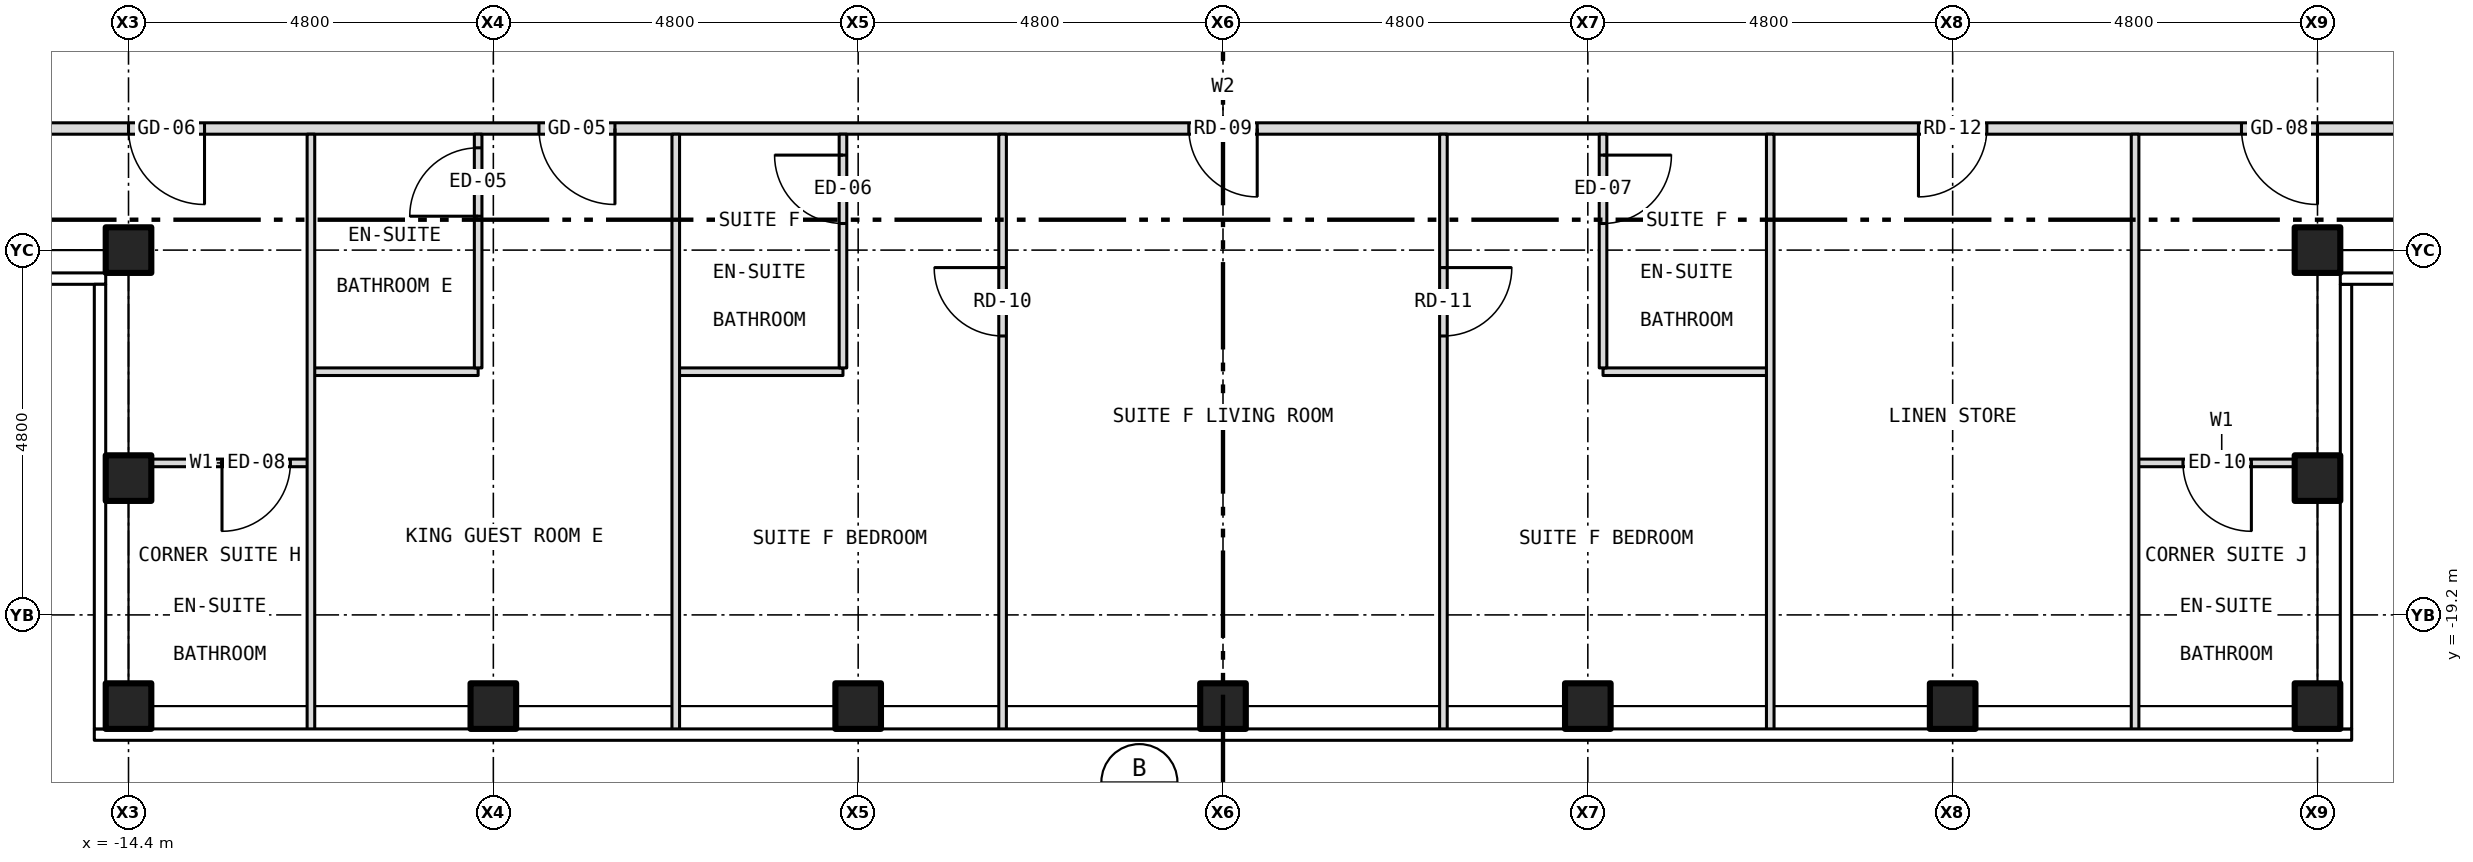
"""IFC4 building model, lengths in metres.
Left out: names, types, materials, properties, quantities, classifications, styles, units other than length and angle.
Written with IfcOpenShell. Run it as: python <this file> out.ifc"""

import sys

from ifc_helpers import new_model, si_unit, direction, frame, frame_2d, origin, origin_2d, place, context, subcontext, project, spatial, rectangle, hollow_rectangle, extrude, element, fill, save


model = new_model("IFC4")
c1 = context("Model", 3, precision=1e-05, world=origin(), true_north=direction((0.0, 1.0)))
c2 = subcontext(c1, "Body", "Model", "MODEL_VIEW")
j1 = project(units=[si_unit("LENGTHUNIT", "METRE"), si_unit("PLANEANGLEUNIT", "RADIAN")], contexts=[c1])
p1 = place(None, origin())
s1 = spatial("IfcSite", under=j1, at=p1, CompositionType="ELEMENT")
p2 = place(p1, origin())
s2 = spatial("IfcBuilding", under=s1, at=p2, CompositionType="ELEMENT")
p3 = place(p2, frame((0.0, 0.0, 258.5)))
s3 = spatial("IfcBuildingStorey", under=s2, at=p3, CompositionType="ELEMENT", Elevation=258.5)
for number, where, z_axis, x_axis in (
    (1, (-14.4, -20.4, -0.15), (0.0, 0.0, 1.0), (1.0, 0.0, 0.0)),
    (2, (-9.6, -20.4, -0.15), (0.0, 0.0, 1.0), (1.0, 0.0, 0.0)),
    (3, (-4.8, -20.4, -0.15), (0.0, 0.0, 1.0), (1.0, 0.0, 0.0)),
    (4, (0.0, -20.4, -0.15), (0.0, 0.0, 1.0), (1.0, 0.0, 0.0)),
    (5, (4.8, -20.4, -0.15), (0.0, 0.0, 1.0), (1.0, 0.0, 0.0)),
    (6, (9.6, -20.4, -0.15), (0.0, 0.0, 1.0), (1.0, 0.0, 0.0)),
    (7, (14.4, -20.4, -0.15), (0.0, 0.0, 1.0), (1.0, 0.0, 0.0)),
    (8, (-14.4, -14.4, -0.15), (0.0, 0.0, 1.0), (1.0, 0.0, 0.0)),
    (9, (-14.4, -17.4, -0.15), (0.0, 0.0, 1.0), (1.0, 0.0, 0.0)),
    (10, (14.4, -14.4, -0.15), (0.0, 0.0, 1.0), (1.0, 0.0, 0.0)),
    (11, (14.4, -17.4, -0.15), (0.0, 0.0, 1.0), (1.0, 0.0, 0.0)),
):
    element("IfcColumn", number, at=place(p3, frame(where, z_axis=z_axis, x_axis=x_axis)), inside=s3, PredefinedType="COLUMN", context=c2, shape_type="SweptSolid", body=[
        extrude(hollow_rectangle(XDim=0.6, YDim=0.6, WallThickness=0.03, at=origin_2d()), origin(), (0.0, 0.0, 1.0), 3.5),
    ])
p4 = place(p3, frame((-14.28, -17.2, 0.0), z_axis=(0.0, 0.0, 1.0), x_axis=(1.0, 0.0, 0.0)))
e12 = element("IfcWall", 12, at=p4, inside=s3, PredefinedType="PARTITIONING", context=c2, shape_type="SweptSolid", body=[
    extrude(rectangle(XDim=2.28, YDim=0.1, at=frame_2d((1.14, 0.0))), origin(), (0.0, 0.0, 1.0), 3.35),
])
p5 = place(p4, frame((1.11, 0.0, 0.0)))
e13 = element("IfcOpeningElement", 13, at=p5, cuts=e12, PredefinedType="OPENING", context=c2, shape_type="SweptSolid", body=[
    extrude(rectangle(XDim=0.9, YDim=2.1, at=frame_2d((0.45, 1.05))), frame((0.0, 0.062, 0.0), z_axis=(0.0, -1.0, 0.0), x_axis=(1.0, 0.0, 0.0)), (0.0, 0.0, 1.0), 0.124),
])
p6 = place(p3, frame((12.0, -17.2, 0.0), z_axis=(0.0, 0.0, 1.0), x_axis=(1.0, 0.0, 0.0)))
e14 = element("IfcWall", 14, at=p6, inside=s3, PredefinedType="PARTITIONING", context=c2, shape_type="SweptSolid", body=[
    extrude(rectangle(XDim=2.28, YDim=0.1, at=frame_2d((1.14, 0.0))), origin(), (0.0, 0.0, 1.0), 3.35),
])
p7 = place(p6, frame((0.63, 0.0, 0.0)))
e15 = element("IfcOpeningElement", 15, at=p7, cuts=e14, PredefinedType="OPENING", context=c2, shape_type="SweptSolid", body=[
    extrude(rectangle(XDim=0.9, YDim=2.1, at=frame_2d((0.45, 1.05))), frame((0.0, 0.062, 0.0), z_axis=(0.0, -1.0, 0.0), x_axis=(1.0, 0.0, 0.0)), (0.0, 0.0, 1.0), 0.124),
])
for number, where, z_axis, x_axis in (
    (16, (-12.0, -16.0, 0.0), (0.0, 0.0, 1.0), (1.0, 0.0, 0.0)),
    (17, (-7.2, -16.0, 0.0), (0.0, 0.0, 1.0), (1.0, 0.0, 0.0)),
    (18, (5.0, -16.0, 0.0), (0.0, 0.0, 1.0), (1.0, 0.0, 0.0)),
):
    element("IfcWall", number, at=place(p3, frame(where, z_axis=z_axis, x_axis=x_axis)), inside=s3, PredefinedType="PARTITIONING", context=c2, shape_type="SweptSolid", body=[
        extrude(rectangle(XDim=2.2, YDim=0.1, at=frame_2d((1.1, 0.0))), origin(), (0.0, 0.0, 1.0), 3.35),
    ])
p8 = place(p3, frame((-15.8, -12.8, 0.0), z_axis=(0.0, 0.0, 1.0), x_axis=(1.0, 0.0, 0.0)))
e19 = element("IfcWall", 19, at=p8, inside=s3, PredefinedType="PARTITIONING", context=c2, shape_type="SweptSolid", body=[
    extrude(rectangle(XDim=31.6, YDim=0.15, at=frame_2d((15.8, 0.0))), origin(), (0.0, 0.0, 1.0), 3.35),
])
p9 = place(p8, frame((6.8, 0.0, 0.0)))
e20 = element("IfcOpeningElement", 20, at=p9, cuts=e19, PredefinedType="OPENING", context=c2, shape_type="SweptSolid", body=[
    extrude(rectangle(XDim=1.0, YDim=2.1, at=frame_2d((0.5, 1.05))), frame((0.0, 0.087, 0.0), z_axis=(0.0, -1.0, 0.0), x_axis=(1.0, 0.0, 0.0)), (0.0, 0.0, 1.0), 0.174),
])
p10 = place(p8, frame((15.35, 0.0, 0.0)))
e21 = element("IfcOpeningElement", 21, at=p10, cuts=e19, PredefinedType="OPENING", context=c2, shape_type="SweptSolid", body=[
    extrude(rectangle(XDim=0.9, YDim=2.1, at=frame_2d((0.45, 1.05))), frame((0.0, 0.087, 0.0), z_axis=(0.0, -1.0, 0.0), x_axis=(1.0, 0.0, 0.0)), (0.0, 0.0, 1.0), 0.174),
])
p11 = place(p8, frame((24.95, 0.0, 0.0)))
e22 = element("IfcOpeningElement", 22, at=p11, cuts=e19, PredefinedType="OPENING", context=c2, shape_type="SweptSolid", body=[
    extrude(rectangle(XDim=0.9, YDim=2.1, at=frame_2d((0.45, 1.05))), frame((0.0, 0.087, 0.0), z_axis=(0.0, -1.0, 0.0), x_axis=(1.0, 0.0, 0.0)), (0.0, 0.0, 1.0), 0.174),
])
p12 = place(p8, frame((1.4, 0.0, 0.0)))
e23 = element("IfcOpeningElement", 23, at=p12, cuts=e19, PredefinedType="OPENING", context=c2, shape_type="SweptSolid", body=[
    extrude(rectangle(XDim=1.0, YDim=2.1, at=frame_2d((0.5, 1.05))), frame((0.0, 0.087, 0.0), z_axis=(0.0, -1.0, 0.0), x_axis=(1.0, 0.0, 0.0)), (0.0, 0.0, 1.0), 0.174),
])
p13 = place(p8, frame((29.2, 0.0, 0.0)))
e24 = element("IfcOpeningElement", 24, at=p13, cuts=e19, PredefinedType="OPENING", context=c2, shape_type="SweptSolid", body=[
    extrude(rectangle(XDim=1.0, YDim=2.1, at=frame_2d((0.5, 1.05))), frame((0.0, 0.087, 0.0), z_axis=(0.0, -1.0, 0.0), x_axis=(1.0, 0.0, 0.0)), (0.0, 0.0, 1.0), 0.174),
])
p14 = place(p3, frame((-12.0, -20.73, 0.0), z_axis=(0.0, 0.0, 1.0), x_axis=(0.0, 1.0, 0.0)))
e25 = element("IfcWall", 25, at=p14, inside=s3, PredefinedType="PARTITIONING", context=c2, shape_type="SweptSolid", body=[
    extrude(rectangle(XDim=7.855, YDim=0.1, at=frame_2d((3.927, 0.0))), origin(), (0.0, 0.0, 1.0), 3.35),
])
p15 = place(p3, frame((-9.8, -15.95, 0.0), z_axis=(0.0, 0.0, 1.0), x_axis=(0.0, 1.0, 0.0)))
e26 = element("IfcWall", 26, at=p15, inside=s3, PredefinedType="PARTITIONING", context=c2, shape_type="SweptSolid", body=[
    extrude(rectangle(XDim=3.075, YDim=0.1, at=frame_2d((1.538, 0.0))), origin(), (0.0, 0.0, 1.0), 2.728),
])
p16 = place(p15, frame((1.996, 0.0, 0.0)))
e27 = element("IfcOpeningElement", 27, at=p16, cuts=e26, PredefinedType="OPENING", context=c2, shape_type="SweptSolid", body=[
    extrude(rectangle(XDim=0.9, YDim=2.1, at=frame_2d((0.45, 1.05))), frame((0.0, 0.062, 0.0), z_axis=(0.0, -1.0, 0.0), x_axis=(1.0, 0.0, 0.0)), (0.0, 0.0, 1.0), 0.124),
])
p17 = place(p3, frame((-7.2, -20.73, 0.0), z_axis=(0.0, 0.0, 1.0), x_axis=(0.0, 1.0, 0.0)))
e28 = element("IfcWall", 28, at=p17, inside=s3, PredefinedType="PARTITIONING", context=c2, shape_type="SweptSolid", body=[
    extrude(rectangle(XDim=7.855, YDim=0.1, at=frame_2d((3.927, 0.0))), origin(), (0.0, 0.0, 1.0), 3.35),
])
p18 = place(p3, frame((-5.0, -15.95, 0.0), z_axis=(0.0, 0.0, 1.0), x_axis=(0.0, 1.0, 0.0)))
e29 = element("IfcWall", 29, at=p18, inside=s3, PredefinedType="PARTITIONING", context=c2, shape_type="SweptSolid", body=[
    extrude(rectangle(XDim=3.075, YDim=0.1, at=frame_2d((1.538, 0.0))), origin(), (0.0, 0.0, 1.0), 3.35),
])
p19 = place(p18, frame((1.9, 0.0, 0.0)))
e30 = element("IfcOpeningElement", 30, at=p19, cuts=e29, PredefinedType="OPENING", context=c2, shape_type="SweptSolid", body=[
    extrude(rectangle(XDim=0.9, YDim=2.1, at=frame_2d((0.45, 1.05))), frame((0.0, 0.062, 0.0), z_axis=(0.0, -1.0, 0.0), x_axis=(1.0, 0.0, 0.0)), (0.0, 0.0, 1.0), 0.124),
])
p20 = place(p3, frame((-2.9, -20.73, 0.0), z_axis=(0.0, 0.0, 1.0), x_axis=(0.0, 1.0, 0.0)))
e31 = element("IfcWall", 31, at=p20, inside=s3, PredefinedType="PARTITIONING", context=c2, shape_type="SweptSolid", body=[
    extrude(rectangle(XDim=7.855, YDim=0.1, at=frame_2d((3.927, 0.0))), origin(), (0.0, 0.0, 1.0), 3.35),
])
p21 = place(p20, frame((5.2, 0.0, 0.0)))
e32 = element("IfcOpeningElement", 32, at=p21, cuts=e31, PredefinedType="OPENING", context=c2, shape_type="SweptSolid", body=[
    extrude(rectangle(XDim=0.9, YDim=2.1, at=frame_2d((0.45, 1.05))), frame((0.0, 0.062, 0.0), z_axis=(0.0, -1.0, 0.0), x_axis=(1.0, 0.0, 0.0)), (0.0, 0.0, 1.0), 0.124),
])
p22 = place(p3, frame((2.9, -20.73, 0.0), z_axis=(0.0, 0.0, 1.0), x_axis=(0.0, 1.0, 0.0)))
e33 = element("IfcWall", 33, at=p22, inside=s3, PredefinedType="PARTITIONING", context=c2, shape_type="SweptSolid", body=[
    extrude(rectangle(XDim=7.855, YDim=0.1, at=frame_2d((3.927, 0.0))), origin(), (0.0, 0.0, 1.0), 3.35),
])
p23 = place(p22, frame((5.2, 0.0, 0.0)))
e34 = element("IfcOpeningElement", 34, at=p23, cuts=e33, PredefinedType="OPENING", context=c2, shape_type="SweptSolid", body=[
    extrude(rectangle(XDim=0.9, YDim=2.1, at=frame_2d((0.45, 1.05))), frame((0.0, 0.062, 0.0), z_axis=(0.0, -1.0, 0.0), x_axis=(1.0, 0.0, 0.0)), (0.0, 0.0, 1.0), 0.124),
])
p24 = place(p3, frame((5.0, -15.95, 0.0), z_axis=(0.0, 0.0, 1.0), x_axis=(0.0, 1.0, 0.0)))
e35 = element("IfcWall", 35, at=p24, inside=s3, PredefinedType="PARTITIONING", context=c2, shape_type="SweptSolid", body=[
    extrude(rectangle(XDim=3.075, YDim=0.1, at=frame_2d((1.538, 0.0))), origin(), (0.0, 0.0, 1.0), 3.35),
])
p25 = place(p24, frame((1.9, 0.0, 0.0)))
e36 = element("IfcOpeningElement", 36, at=p25, cuts=e35, PredefinedType="OPENING", context=c2, shape_type="SweptSolid", body=[
    extrude(rectangle(XDim=0.9, YDim=2.1, at=frame_2d((0.45, 1.05))), frame((0.0, 0.062, 0.0), z_axis=(0.0, -1.0, 0.0), x_axis=(1.0, 0.0, 0.0)), (0.0, 0.0, 1.0), 0.124),
])
for number, where, z_axis, x_axis in (
    (37, (7.2, -20.73, 0.0), (0.0, 0.0, 1.0), (0.0, 1.0, 0.0)),
    (38, (12.0, -20.73, 0.0), (0.0, 0.0, 1.0), (0.0, 1.0, 0.0)),
):
    element("IfcWall", number, at=place(p3, frame(where, z_axis=z_axis, x_axis=x_axis)), inside=s3, PredefinedType="PARTITIONING", context=c2, shape_type="SweptSolid", body=[
        extrude(rectangle(XDim=7.855, YDim=0.1, at=frame_2d((3.927, 0.0))), origin(), (0.0, 0.0, 1.0), 3.35),
    ])
p26 = place(p9, origin())
e39 = element("IfcDoor", 39, at=p26, inside=s3, OperationType="SINGLE_SWING_RIGHT", PredefinedType="DOOR", context=c2, shape_type="SweptSolid", body=[
    extrude(rectangle(XDim=1.0, YDim=2.1, at=frame_2d((0.5, 1.05))), frame((0.0, 0.025, 0.0), z_axis=(0.0, -1.0, 0.0), x_axis=(1.0, 0.0, 0.0)), (0.0, 0.0, 1.0), 0.05),
])
fill(e20, e39)
p27 = place(p16, origin())
e40 = element("IfcDoor", 40, at=p27, inside=s3, OperationType="SINGLE_SWING_LEFT", PredefinedType="DOOR", context=c2, shape_type="SweptSolid", body=[
    extrude(rectangle(XDim=0.9, YDim=2.1, at=frame_2d((0.45, 1.05))), frame((0.0, 0.025, 0.0), z_axis=(0.0, -1.0, 0.0), x_axis=(1.0, 0.0, 0.0)), (0.0, 0.0, 1.0), 0.05),
])
fill(e27, e40)
p28 = place(p10, origin())
e41 = element("IfcDoor", 41, at=p28, inside=s3, OperationType="SINGLE_SWING_RIGHT", PredefinedType="DOOR", context=c2, shape_type="SweptSolid", body=[
    extrude(rectangle(XDim=0.9, YDim=2.1, at=frame_2d((0.45, 1.05))), frame((0.0, 0.025, 0.0), z_axis=(0.0, -1.0, 0.0), x_axis=(1.0, 0.0, 0.0)), (0.0, 0.0, 1.0), 0.05),
])
fill(e21, e41)
p29 = place(p21, origin())
e42 = element("IfcDoor", 42, at=p29, inside=s3, OperationType="SINGLE_SWING_RIGHT", PredefinedType="DOOR", context=c2, shape_type="SweptSolid", body=[
    extrude(rectangle(XDim=0.9, YDim=2.1, at=frame_2d((0.45, 1.05))), frame((0.0, 0.025, 0.0), z_axis=(0.0, -1.0, 0.0), x_axis=(1.0, 0.0, 0.0)), (0.0, 0.0, 1.0), 0.05),
])
fill(e32, e42)
p30 = place(p19, origin())
e43 = element("IfcDoor", 43, at=p30, inside=s3, OperationType="SINGLE_SWING_RIGHT", PredefinedType="DOOR", context=c2, shape_type="SweptSolid", body=[
    extrude(rectangle(XDim=0.9, YDim=2.1, at=frame_2d((0.45, 1.05))), frame((0.0, 0.025, 0.0), z_axis=(0.0, -1.0, 0.0), x_axis=(1.0, 0.0, 0.0)), (0.0, 0.0, 1.0), 0.05),
])
fill(e30, e43)
p31 = place(p23, origin())
e44 = element("IfcDoor", 44, at=p31, inside=s3, OperationType="SINGLE_SWING_RIGHT", PredefinedType="DOOR", context=c2, shape_type="SweptSolid", body=[
    extrude(rectangle(XDim=0.9, YDim=2.1, at=frame_2d((0.45, 1.05))), frame((0.0, 0.025, 0.0), z_axis=(0.0, -1.0, 0.0), x_axis=(1.0, 0.0, 0.0)), (0.0, 0.0, 1.0), 0.05),
])
fill(e34, e44)
p32 = place(p25, origin())
e45 = element("IfcDoor", 45, at=p32, inside=s3, OperationType="SINGLE_SWING_RIGHT", PredefinedType="DOOR", context=c2, shape_type="SweptSolid", body=[
    extrude(rectangle(XDim=0.9, YDim=2.1, at=frame_2d((0.45, 1.05))), frame((0.0, 0.025, 0.0), z_axis=(0.0, -1.0, 0.0), x_axis=(1.0, 0.0, 0.0)), (0.0, 0.0, 1.0), 0.05),
])
fill(e36, e45)
p33 = place(p11, origin())
e46 = element("IfcDoor", 46, at=p33, inside=s3, OperationType="SINGLE_SWING_LEFT", PredefinedType="DOOR", context=c2, shape_type="SweptSolid", body=[
    extrude(rectangle(XDim=0.9, YDim=2.1, at=frame_2d((0.45, 1.05))), frame((0.0, 0.025, 0.0), z_axis=(0.0, -1.0, 0.0), x_axis=(1.0, 0.0, 0.0)), (0.0, 0.0, 1.0), 0.05),
])
fill(e22, e46)
p34 = place(p5, origin())
e47 = element("IfcDoor", 47, at=p34, inside=s3, OperationType="SINGLE_SWING_LEFT", PredefinedType="DOOR", context=c2, shape_type="SweptSolid", body=[
    extrude(rectangle(XDim=0.9, YDim=2.1, at=frame_2d((0.45, 1.05))), frame((0.0, 0.025, 0.0), z_axis=(0.0, -1.0, 0.0), x_axis=(1.0, 0.0, 0.0)), (0.0, 0.0, 1.0), 0.05),
])
fill(e13, e47)
p35 = place(p12, origin())
e48 = element("IfcDoor", 48, at=p35, inside=s3, OperationType="SINGLE_SWING_RIGHT", PredefinedType="DOOR", context=c2, shape_type="SweptSolid", body=[
    extrude(rectangle(XDim=1.0, YDim=2.1, at=frame_2d((0.5, 1.05))), frame((0.0, 0.025, 0.0), z_axis=(0.0, -1.0, 0.0), x_axis=(1.0, 0.0, 0.0)), (0.0, 0.0, 1.0), 0.05),
])
fill(e23, e48)
p36 = place(p7, origin())
e49 = element("IfcDoor", 49, at=p36, inside=s3, OperationType="SINGLE_SWING_RIGHT", PredefinedType="DOOR", context=c2, shape_type="SweptSolid", body=[
    extrude(rectangle(XDim=0.9, YDim=2.1, at=frame_2d((0.45, 1.05))), frame((0.0, 0.025, 0.0), z_axis=(0.0, -1.0, 0.0), x_axis=(1.0, 0.0, 0.0)), (0.0, 0.0, 1.0), 0.05),
])
fill(e15, e49)
p37 = place(p13, origin())
e50 = element("IfcDoor", 50, at=p37, inside=s3, OperationType="SINGLE_SWING_RIGHT", PredefinedType="DOOR", context=c2, shape_type="SweptSolid", body=[
    extrude(rectangle(XDim=1.0, YDim=2.1, at=frame_2d((0.5, 1.05))), frame((0.0, 0.025, 0.0), z_axis=(0.0, -1.0, 0.0), x_axis=(1.0, 0.0, 0.0)), (0.0, 0.0, 1.0), 0.05),
])
fill(e24, e50)
save(model, sys.argv[1])
